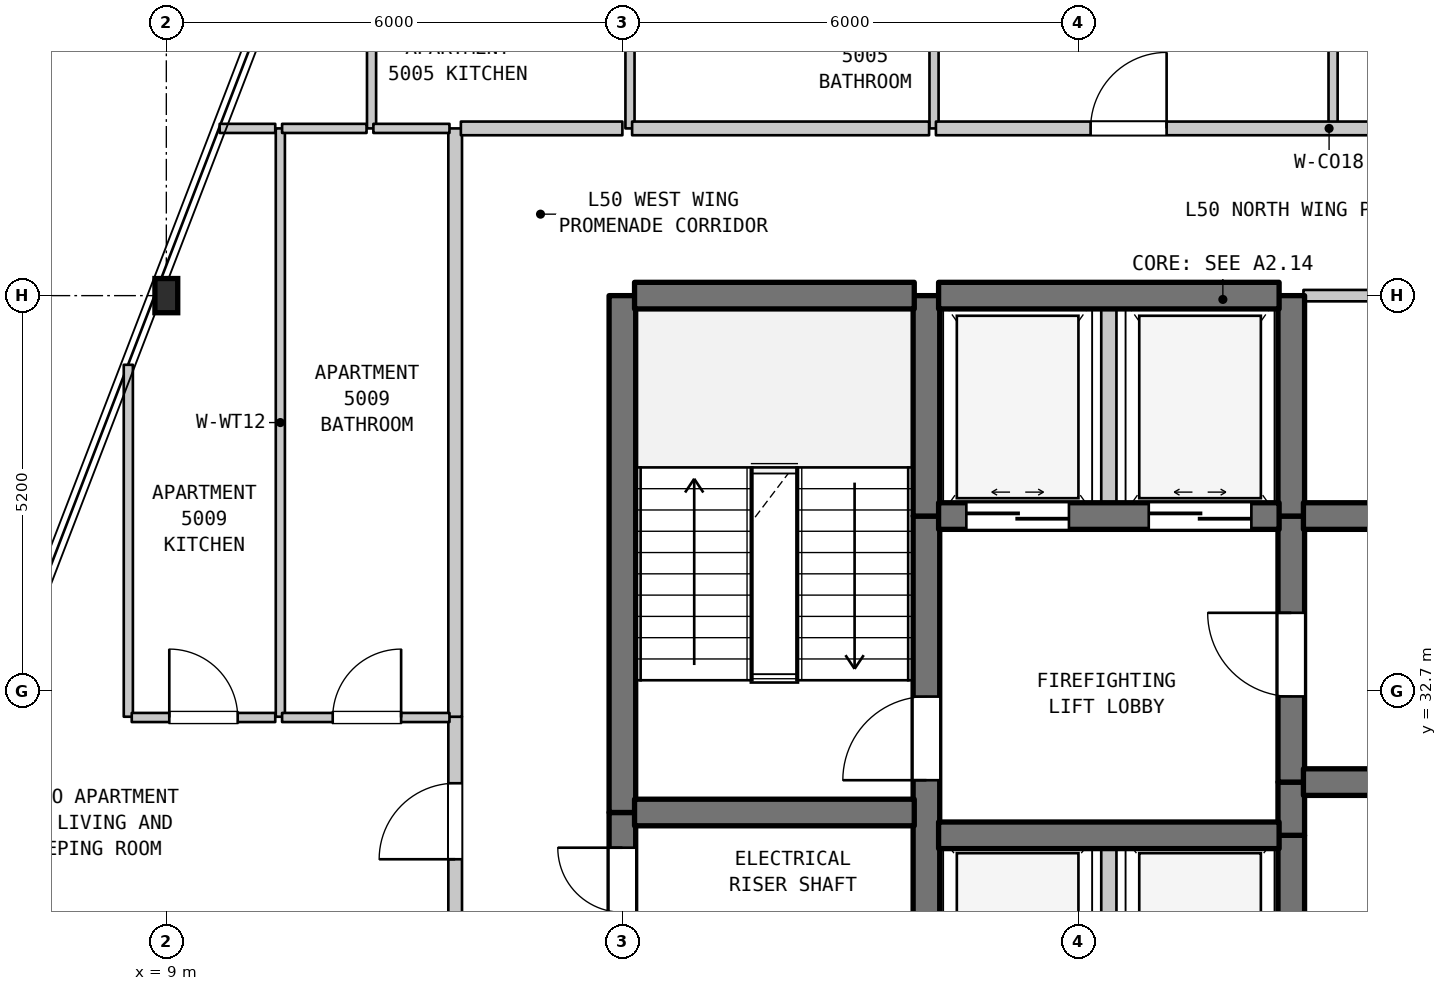
"""IFC4 building model, lengths in metres.
Left out: names, types, materials, properties, quantities, classifications, styles, units other than length and angle.
Written with IfcOpenShell. Run it as: python <this file> out.ifc"""

import sys

from ifc_helpers import new_model, si_unit, direction, frame, frame_2d, origin, origin_2d, place, context, subcontext, project, spatial, rectangle, i_section, extrude, element, fill, save


model = new_model("IFC4")
c1 = context("Model", 3, precision=1e-05, world=origin(), true_north=direction((0.0, 1.0)))
c2 = subcontext(c1, "Body", "Model", "MODEL_VIEW")
j1 = project(units=[si_unit("LENGTHUNIT", "METRE"), si_unit("PLANEANGLEUNIT", "RADIAN")], contexts=[c1])
p1 = place(None, origin())
s1 = spatial("IfcSite", under=j1, at=p1, CompositionType="ELEMENT")
p2 = place(p1, origin())
s2 = spatial("IfcBuilding", under=s1, at=p2, CompositionType="ELEMENT")
p3 = place(p2, frame((0.0, 0.0, 203.2)))
s3 = spatial("IfcBuildingStorey", under=s2, at=p3, CompositionType="ELEMENT", Elevation=203.2)
p4 = place(p3, frame((9.0, 37.9, 0.0), z_axis=(0.0, 0.0, 1.0), x_axis=(1.0, 0.0, 0.0)))
e1 = element("IfcColumn", 1, at=p4, inside=s3, PredefinedType="COLUMN", context=c2, shape_type="SweptSolid", body=[
    extrude(i_section(OverallWidth=0.3, OverallDepth=0.45, WebThickness=0.014, FlangeThickness=0.026, FilletRadius=0.027, at=origin_2d()), origin(), (0.0, 0.0, 1.0), 3.7),
])
p5 = place(p3, frame((8.5, 32.36, 0.0), z_axis=(0.0, 0.0, 1.0), x_axis=(0.0, 1.0, 0.0)))
e2 = element("IfcWall", 2, at=p5, inside=s3, PredefinedType="PARTITIONING", context=c2, shape_type="SweptSolid", body=[
    extrude(rectangle(XDim=4.63, YDim=0.12, at=frame_2d((2.315, 0.0))), origin(), (0.0, 0.0, 1.0), 3.39),
])
p6 = place(p3, frame((10.5, 32.36, 0.0), z_axis=(0.0, 0.0, 1.0), x_axis=(0.0, 1.0, 0.0)))
e3 = element("IfcWall", 3, at=p6, inside=s3, PredefinedType="PARTITIONING", context=c2, shape_type="SweptSolid", body=[
    extrude(rectangle(XDim=7.74, YDim=0.12, at=frame_2d((3.87, 0.0))), origin(), (0.0, 0.0, 1.0), 3.39),
])
p7 = place(p3, frame((11.7, 40.1, 0.0), z_axis=(0.0, 0.0, 1.0), x_axis=(0.0, 1.0, 0.0)))
e4 = element("IfcWall", 4, at=p7, inside=s3, PredefinedType="PARTITIONING", context=c2, shape_type="SweptSolid", body=[
    extrude(rectangle(XDim=2.3, YDim=0.12, at=frame_2d((1.15, 0.0))), origin(), (0.0, 0.0, 1.0), 3.39),
])
p8 = place(p3, frame((12.8, 29.61, 0.0), z_axis=(0.0, 0.0, 1.0), x_axis=(0.0, 1.0, 0.0)))
e5 = element("IfcWall", 5, at=p8, inside=s3, PredefinedType="STANDARD", context=c2, shape_type="SweptSolid", body=[
    extrude(rectangle(XDim=2.75, YDim=0.18, at=frame_2d((1.375, 0.0))), origin(), (0.0, 0.0, 1.0), 3.39),
])
p9 = place(p8, frame((0.875, 0.0, 0.0)))
e6 = element("IfcOpeningElement", 6, at=p9, cuts=e5, PredefinedType="OPENING", context=c2, shape_type="SweptSolid", body=[
    extrude(rectangle(XDim=1.0, YDim=2.15, at=frame_2d((0.5, 1.075))), frame((0.0, 0.1, 0.0), z_axis=(0.0, -1.0, 0.0), x_axis=(1.0, 0.0, 0.0)), (0.0, 0.0, 1.0), 0.2),
])
p10 = place(p3, frame((12.8, 32.36, 0.0), z_axis=(0.0, 0.0, 1.0), x_axis=(0.0, 1.0, 0.0)))
e7 = element("IfcWall", 7, at=p10, inside=s3, PredefinedType="STANDARD", context=c2, shape_type="SweptSolid", body=[
    extrude(rectangle(XDim=7.74, YDim=0.18, at=frame_2d((3.87, 0.0))), origin(), (0.0, 0.0, 1.0), 3.39),
])
p11 = place(p3, frame((15.0, 29.5, 0.0), z_axis=(0.0, 0.0, 1.0), x_axis=(0.0, 1.0, 0.0)))
e8 = element("IfcWall", 8, at=p11, inside=s3, PredefinedType="SHEAR", context=c2, shape_type="SweptSolid", body=[
    extrude(rectangle(XDim=1.6, YDim=0.35, at=frame_2d((0.8, 0.0))), origin(), (0.0, 0.0, 1.0), 3.39),
])
p12 = place(p11, frame((0.287, 0.0, 0.0)))
e9 = element("IfcOpeningElement", 9, at=p12, cuts=e8, PredefinedType="OPENING", context=c2, shape_type="SweptSolid", body=[
    extrude(rectangle(XDim=0.85, YDim=2.1, at=frame_2d((0.425, 1.05))), frame((0.0, 0.185, 0.0), z_axis=(0.0, -1.0, 0.0), x_axis=(1.0, 0.0, 0.0)), (0.0, 0.0, 1.0), 0.37),
])
p13 = place(p3, frame((15.0, 31.1, 0.0), z_axis=(0.0, 0.0, 1.0), x_axis=(0.0, 1.0, 0.0)))
e10 = element("IfcWall", 10, at=p13, inside=s3, PredefinedType="SHEAR", context=c2, shape_type="SweptSolid", body=[
    extrude(rectangle(XDim=6.8, YDim=0.35, at=frame_2d((3.4, 0.0))), origin(), (0.0, 0.0, 1.0), 3.39),
])
p14 = place(p3, frame((15.1, 40.1, 0.0), z_axis=(0.0, 0.0, 1.0), x_axis=(0.0, 1.0, 0.0)))
e11 = element("IfcWall", 11, at=p14, inside=s3, PredefinedType="PARTITIONING", context=c2, shape_type="SweptSolid", body=[
    extrude(rectangle(XDim=2.3, YDim=0.12, at=frame_2d((1.15, 0.0))), origin(), (0.0, 0.0, 1.0), 3.39),
])
p15 = place(p3, frame((19.0, 29.5, 0.0), z_axis=(0.0, 0.0, 1.0), x_axis=(0.0, 1.0, 0.0)))
e12 = element("IfcWall", 12, at=p15, inside=s3, PredefinedType="SHEAR", context=c2, shape_type="SweptSolid", body=[
    extrude(rectangle(XDim=5.5, YDim=0.35, at=frame_2d((2.75, 0.0))), origin(), (0.0, 0.0, 1.0), 3.39),
])
p16 = place(p15, frame((2.025, 0.0, 0.0)))
e13 = element("IfcOpeningElement", 13, at=p16, cuts=e12, PredefinedType="OPENING", context=c2, shape_type="SweptSolid", body=[
    extrude(rectangle(XDim=1.1, YDim=2.15, at=frame_2d((0.55, 1.075))), frame((0.0, 0.185, 0.0), z_axis=(0.0, -1.0, 0.0), x_axis=(1.0, 0.0, 0.0)), (0.0, 0.0, 1.0), 0.37),
])
p17 = place(p3, frame((19.0, 35.0, 0.0), z_axis=(0.0, 0.0, 1.0), x_axis=(0.0, 1.0, 0.0)))
e14 = element("IfcWall", 14, at=p17, inside=s3, PredefinedType="SHEAR", context=c2, shape_type="SweptSolid", body=[
    extrude(rectangle(XDim=2.9, YDim=0.35, at=frame_2d((1.45, 0.0))), origin(), (0.0, 0.0, 1.0), 3.39),
])
p18 = place(p3, frame((19.1, 40.1, 0.0), z_axis=(0.0, 0.0, 1.0), x_axis=(0.0, 1.0, 0.0)))
e15 = element("IfcWall", 15, at=p18, inside=s3, PredefinedType="PARTITIONING", context=c2, shape_type="SweptSolid", body=[
    extrude(rectangle(XDim=2.3, YDim=0.12, at=frame_2d((1.15, 0.0))), origin(), (0.0, 0.0, 1.0), 3.39),
])
p19 = place(p3, frame((21.4, 28.2, 0.0), z_axis=(0.0, 0.0, 1.0), x_axis=(0.0, 1.0, 0.0)))
e16 = element("IfcWall", 16, at=p19, inside=s3, PredefinedType="STANDARD", context=c2, shape_type="SweptSolid", body=[
    extrude(rectangle(XDim=2.6, YDim=0.2, at=frame_2d((1.3, 0.0))), origin(), (0.0, 0.0, 1.0), 3.39),
])
p20 = place(p3, frame((21.4, 35.0, 0.0), z_axis=(0.0, 0.0, 1.0), x_axis=(0.0, 1.0, 0.0)))
e17 = element("IfcWall", 17, at=p20, inside=s3, PredefinedType="STANDARD", context=c2, shape_type="SweptSolid", body=[
    extrude(rectangle(XDim=2.9, YDim=0.2, at=frame_2d((1.45, 0.0))), origin(), (0.0, 0.0, 1.0), 3.39),
])
p21 = place(p3, frame((23.8, 29.5, 0.0), z_axis=(0.0, 0.0, 1.0), x_axis=(0.0, 1.0, 0.0)))
e18 = element("IfcWall", 18, at=p21, inside=s3, PredefinedType="SHEAR", context=c2, shape_type="SweptSolid", body=[
    extrude(rectangle(XDim=1.3, YDim=0.35, at=frame_2d((0.65, 0.0))), origin(), (0.0, 0.0, 1.0), 3.39),
])
p22 = place(p3, frame((23.8, 30.8, 0.0), z_axis=(0.0, 0.0, 1.0), x_axis=(0.0, 1.0, 0.0)))
e19 = element("IfcWall", 19, at=p22, inside=s3, PredefinedType="SHEAR", context=c2, shape_type="SweptSolid", body=[
    extrude(rectangle(XDim=0.7, YDim=0.35, at=frame_2d((0.35, 0.0))), origin(), (0.0, 0.0, 1.0), 3.39),
])
p23 = place(p3, frame((23.8, 31.5, 0.0), z_axis=(0.0, 0.0, 1.0), x_axis=(0.0, 1.0, 0.0)))
e20 = element("IfcWall", 20, at=p23, inside=s3, PredefinedType="SHEAR", context=c2, shape_type="SweptSolid", body=[
    extrude(rectangle(XDim=3.5, YDim=0.35, at=frame_2d((1.75, 0.0))), origin(), (0.0, 0.0, 1.0), 3.39),
])
p24 = place(p23, frame((1.127, 0.0, 0.0)))
e21 = element("IfcOpeningElement", 21, at=p24, cuts=e20, PredefinedType="OPENING", context=c2, shape_type="SweptSolid", body=[
    extrude(rectangle(XDim=1.1, YDim=2.15, at=frame_2d((0.55, 1.075))), frame((0.0, 0.185, 0.0), z_axis=(0.0, -1.0, 0.0), x_axis=(1.0, 0.0, 0.0)), (0.0, 0.0, 1.0), 0.37),
])
p25 = place(p3, frame((23.8, 35.0, 0.0), z_axis=(0.0, 0.0, 1.0), x_axis=(0.0, 1.0, 0.0)))
e22 = element("IfcWall", 22, at=p25, inside=s3, PredefinedType="SHEAR", context=c2, shape_type="SweptSolid", body=[
    extrude(rectangle(XDim=2.9, YDim=0.35, at=frame_2d((1.45, 0.0))), origin(), (0.0, 0.0, 1.0), 3.39),
])
p26 = place(p3, frame((24.35, 40.1, 0.0), z_axis=(0.0, 0.0, 1.0), x_axis=(0.0, 1.0, 0.0)))
e23 = element("IfcWall", 23, at=p26, inside=s3, PredefinedType="PARTITIONING", context=c2, shape_type="SweptSolid", body=[
    extrude(rectangle(XDim=2.05, YDim=0.12, at=frame_2d((1.025, 0.0))), origin(), (0.0, 0.0, 1.0), 3.39),
])
p27 = place(p3, frame((19.16, 30.8, 0.0), z_axis=(0.0, 0.0, 1.0), x_axis=(1.0, 0.0, 0.0)))
e24 = element("IfcWall", 24, at=p27, inside=s3, PredefinedType="SHEAR", context=c2, shape_type="SweptSolid", body=[
    extrude(rectangle(XDim=4.48, YDim=0.35, at=frame_2d((2.24, 0.0))), origin(), (0.0, 0.0, 1.0), 3.39),
])
p28 = place(p3, frame((15.16, 31.1, 0.0), z_axis=(0.0, 0.0, 1.0), x_axis=(1.0, 0.0, 0.0)))
e25 = element("IfcWall", 25, at=p28, inside=s3, PredefinedType="SHEAR", context=c2, shape_type="SweptSolid", body=[
    extrude(rectangle(XDim=3.68, YDim=0.35, at=frame_2d((1.84, 0.0))), origin(), (0.0, 0.0, 1.0), 3.39),
])
p29 = place(p3, frame((23.96, 31.5, 0.0), z_axis=(0.0, 0.0, 1.0), x_axis=(1.0, 0.0, 0.0)))
e26 = element("IfcWall", 26, at=p29, inside=s3, PredefinedType="SHEAR", context=c2, shape_type="SweptSolid", body=[
    extrude(rectangle(XDim=3.18, YDim=0.35, at=frame_2d((1.59, 0.0))), origin(), (0.0, 0.0, 1.0), 3.39),
])
p30 = place(p29, frame((1.094, 0.0, 0.0)))
e27 = element("IfcOpeningElement", 27, at=p30, cuts=e26, PredefinedType="OPENING", context=c2, shape_type="SweptSolid", body=[
    extrude(rectangle(XDim=0.85, YDim=2.1, at=frame_2d((0.425, 1.05))), frame((0.0, 0.185, 0.0), z_axis=(0.0, -1.0, 0.0), x_axis=(1.0, 0.0, 0.0)), (0.0, 0.0, 1.0), 0.37),
])
p31 = place(p3, frame((8.545, 32.35, 0.0), z_axis=(0.0, 0.0, 1.0), x_axis=(1.0, 0.0, 0.0)))
e28 = element("IfcWall", 28, at=p31, inside=s3, PredefinedType="PARTITIONING", context=c2, shape_type="SweptSolid", body=[
    extrude(rectangle(XDim=1.888, YDim=0.12, at=frame_2d((0.944, 0.0))), origin(), (0.0, 0.0, 1.0), 3.39),
])
p32 = place(p31, frame((0.494, 0.0, 0.0)))
e29 = element("IfcOpeningElement", 29, at=p32, cuts=e28, PredefinedType="OPENING", context=c2, shape_type="SweptSolid", body=[
    extrude(rectangle(XDim=0.9, YDim=2.15, at=frame_2d((0.45, 1.075))), frame((0.0, 0.07, 0.0), z_axis=(0.0, -1.0, 0.0), x_axis=(1.0, 0.0, 0.0)), (0.0, 0.0, 1.0), 0.14),
])
p33 = place(p3, frame((10.523, 32.35, 0.0), z_axis=(0.0, 0.0, 1.0), x_axis=(1.0, 0.0, 0.0)))
e30 = element("IfcWall", 30, at=p33, inside=s3, PredefinedType="PARTITIONING", context=c2, shape_type="SweptSolid", body=[
    extrude(rectangle(XDim=2.202, YDim=0.12, at=frame_2d((1.101, 0.0))), origin(), (0.0, 0.0, 1.0), 3.39),
])
p34 = place(p33, frame((0.666, 0.0, 0.0)))
e31 = element("IfcOpeningElement", 31, at=p34, cuts=e30, PredefinedType="OPENING", context=c2, shape_type="SweptSolid", body=[
    extrude(rectangle(XDim=0.9, YDim=2.1, at=frame_2d((0.45, 1.05))), frame((0.0, 0.07, 0.0), z_axis=(0.0, -1.0, 0.0), x_axis=(1.0, 0.0, 0.0)), (0.0, 0.0, 1.0), 0.14),
])
p35 = place(p3, frame((19.16, 35.0, 0.0), z_axis=(0.0, 0.0, 1.0), x_axis=(1.0, 0.0, 0.0)))
e32 = element("IfcWall", 32, at=p35, inside=s3, PredefinedType="SHEAR", context=c2, shape_type="SweptSolid", body=[
    extrude(rectangle(XDim=4.48, YDim=0.35, at=frame_2d((2.24, 0.0))), origin(), (0.0, 0.0, 1.0), 3.39),
])
p36 = place(p35, frame((0.365, 0.0, 0.0)))
e33 = element("IfcOpeningElement", 33, at=p36, cuts=e32, PredefinedType="OPENING", context=c2, shape_type="SweptSolid", body=[
    extrude(rectangle(XDim=1.35, YDim=2.2, at=frame_2d((0.675, 1.1))), frame((0.0, 0.185, 0.0), z_axis=(0.0, -1.0, 0.0), x_axis=(1.0, 0.0, 0.0)), (0.0, 0.0, 1.0), 0.37),
])
p37 = place(p35, frame((2.765, 0.0, 0.0)))
e34 = element("IfcOpeningElement", 34, at=p37, cuts=e32, PredefinedType="OPENING", context=c2, shape_type="SweptSolid", body=[
    extrude(rectangle(XDim=1.35, YDim=2.2, at=frame_2d((0.675, 1.1))), frame((0.0, 0.185, 0.0), z_axis=(0.0, -1.0, 0.0), x_axis=(1.0, 0.0, 0.0)), (0.0, 0.0, 1.0), 0.37),
])
p38 = place(p3, frame((23.96, 35.0, 0.0), z_axis=(0.0, 0.0, 1.0), x_axis=(1.0, 0.0, 0.0)))
e35 = element("IfcWall", 35, at=p38, inside=s3, PredefinedType="SHEAR", context=c2, shape_type="SweptSolid", body=[
    extrude(rectangle(XDim=3.995, YDim=0.35, at=frame_2d((1.998, 0.0))), origin(), (0.0, 0.0, 1.0), 3.39),
])
p39 = place(p38, frame((1.393, 0.0, 0.0)))
e36 = element("IfcOpeningElement", 36, at=p39, cuts=e35, PredefinedType="OPENING", context=c2, shape_type="SweptSolid", body=[
    extrude(rectangle(XDim=0.95, YDim=2.15, at=frame_2d((0.475, 1.075))), frame((0.0, 0.185, 0.0), z_axis=(0.0, -1.0, 0.0), x_axis=(1.0, 0.0, 0.0)), (0.0, 0.0, 1.0), 0.37),
])
p40 = place(p3, frame((15.16, 37.9, 0.0), z_axis=(0.0, 0.0, 1.0), x_axis=(1.0, 0.0, 0.0)))
e37 = element("IfcWall", 37, at=p40, inside=s3, PredefinedType="SHEAR", context=c2, shape_type="SweptSolid", body=[
    extrude(rectangle(XDim=3.68, YDim=0.35, at=frame_2d((1.84, 0.0))), origin(), (0.0, 0.0, 1.0), 3.39),
])
p41 = place(p3, frame((19.16, 37.9, 0.0), z_axis=(0.0, 0.0, 1.0), x_axis=(1.0, 0.0, 0.0)))
e38 = element("IfcWall", 38, at=p41, inside=s3, PredefinedType="SHEAR", context=c2, shape_type="SweptSolid", body=[
    extrude(rectangle(XDim=4.48, YDim=0.35, at=frame_2d((2.24, 0.0))), origin(), (0.0, 0.0, 1.0), 3.39),
])
p42 = place(p3, frame((23.96, 37.9, 0.0), z_axis=(0.0, 0.0, 1.0), x_axis=(1.0, 0.0, 0.0)))
e39 = element("IfcWall", 39, at=p42, inside=s3, PredefinedType="STANDARD", context=c2, shape_type="SweptSolid", body=[
    extrude(rectangle(XDim=3.995, YDim=0.15, at=frame_2d((1.998, 0.0))), origin(), (0.0, 0.0, 1.0), 2.89),
])
p43 = place(p3, frame((9.702, 40.1, 0.0), z_axis=(0.0, 0.0, 1.0), x_axis=(1.0, 0.0, 0.0)))
e40 = element("IfcWall", 40, at=p43, inside=s3, PredefinedType="PARTITIONING", context=c2, shape_type="SweptSolid", body=[
    extrude(rectangle(XDim=0.731, YDim=0.12, at=frame_2d((0.366, 0.0))), origin(), (0.0, 0.0, 1.0), 3.39),
])
p44 = place(p3, frame((10.523, 40.1, 0.0), z_axis=(0.0, 0.0, 1.0), x_axis=(1.0, 0.0, 0.0)))
e41 = element("IfcWall", 41, at=p44, inside=s3, PredefinedType="PARTITIONING", context=c2, shape_type="SweptSolid", body=[
    extrude(rectangle(XDim=1.111, YDim=0.12, at=frame_2d((0.556, 0.0))), origin(), (0.0, 0.0, 1.0), 3.39),
])
p45 = place(p3, frame((11.724, 40.1, 0.0), z_axis=(0.0, 0.0, 1.0), x_axis=(1.0, 0.0, 0.0)))
e42 = element("IfcWall", 42, at=p45, inside=s3, PredefinedType="PARTITIONING", context=c2, shape_type="SweptSolid", body=[
    extrude(rectangle(XDim=1.001, YDim=0.12, at=frame_2d((0.5, 0.0))), origin(), (0.0, 0.0, 1.0), 3.39),
])
p46 = place(p3, frame((12.875, 40.1, 0.0), z_axis=(0.0, 0.0, 1.0), x_axis=(1.0, 0.0, 0.0)))
e43 = element("IfcWall", 43, at=p46, inside=s3, PredefinedType="STANDARD", context=c2, shape_type="SweptSolid", body=[
    extrude(rectangle(XDim=2.125, YDim=0.18, at=frame_2d((1.062, 0.0))), origin(), (0.0, 0.0, 1.0), 3.39),
])
p47 = place(p3, frame((15.128, 40.1, 0.0), z_axis=(0.0, 0.0, 1.0), x_axis=(1.0, 0.0, 0.0)))
e44 = element("IfcWall", 44, at=p47, inside=s3, PredefinedType="STANDARD", context=c2, shape_type="SweptSolid", body=[
    extrude(rectangle(XDim=3.907, YDim=0.18, at=frame_2d((1.954, 0.0))), origin(), (0.0, 0.0, 1.0), 3.39),
])
p48 = place(p3, frame((19.125, 40.1, 0.0), z_axis=(0.0, 0.0, 1.0), x_axis=(1.0, 0.0, 0.0)))
e45 = element("IfcWall", 45, at=p48, inside=s3, PredefinedType="STANDARD", context=c2, shape_type="SweptSolid", body=[
    extrude(rectangle(XDim=10.345, YDim=0.18, at=frame_2d((5.172, 0.0))), origin(), (0.0, 0.0, 1.0), 3.39),
])
p49 = place(p48, frame((2.035, 0.0, 0.0)))
e46 = element("IfcOpeningElement", 46, at=p49, cuts=e45, PredefinedType="OPENING", context=c2, shape_type="SweptSolid", body=[
    extrude(rectangle(XDim=1.0, YDim=2.15, at=frame_2d((0.5, 1.075))), frame((0.0, 0.1, 0.0), z_axis=(0.0, -1.0, 0.0), x_axis=(1.0, 0.0, 0.0)), (0.0, 0.0, 1.0), 0.2),
])
p50 = place(p48, frame((7.235, 0.0, 0.0)))
e47 = element("IfcOpeningElement", 47, at=p50, cuts=e45, PredefinedType="OPENING", context=c2, shape_type="SweptSolid", body=[
    extrude(rectangle(XDim=1.0, YDim=2.15, at=frame_2d((0.5, 1.075))), frame((0.0, 0.1, 0.0), z_axis=(0.0, -1.0, 0.0), x_axis=(1.0, 0.0, 0.0)), (0.0, 0.0, 1.0), 0.2),
])
p51 = place(p9, origin())
e48 = element("IfcDoor", 48, at=p51, inside=s3, OperationType="SINGLE_SWING_LEFT", PredefinedType="DOOR", context=c2, shape_type="SweptSolid", body=[
    extrude(rectangle(XDim=1.0, YDim=2.15, at=frame_2d((0.5, 1.075))), frame((0.0, 0.025, 0.0), z_axis=(0.0, -1.0, 0.0), x_axis=(1.0, 0.0, 0.0)), (0.0, 0.0, 1.0), 0.05),
])
fill(e6, e48)
p52 = place(p12, origin())
e49 = element("IfcDoor", 49, at=p52, inside=s3, OperationType="SINGLE_SWING_RIGHT", PredefinedType="DOOR", context=c2, shape_type="SweptSolid", body=[
    extrude(rectangle(XDim=0.85, YDim=2.1, at=frame_2d((0.425, 1.05))), frame((0.0, 0.025, 0.0), z_axis=(0.0, -1.0, 0.0), x_axis=(1.0, 0.0, 0.0)), (0.0, 0.0, 1.0), 0.05),
])
fill(e9, e49)
p53 = place(p16, origin())
e50 = element("IfcDoor", 50, at=p53, inside=s3, OperationType="SINGLE_SWING_LEFT", PredefinedType="DOOR", context=c2, shape_type="SweptSolid", body=[
    extrude(rectangle(XDim=1.1, YDim=2.15, at=frame_2d((0.55, 1.075))), frame((0.0, 0.025, 0.0), z_axis=(0.0, -1.0, 0.0), x_axis=(1.0, 0.0, 0.0)), (0.0, 0.0, 1.0), 0.05),
])
fill(e13, e50)
p54 = place(p24, origin())
e51 = element("IfcDoor", 51, at=p54, inside=s3, OperationType="SINGLE_SWING_RIGHT", PredefinedType="DOOR", context=c2, shape_type="SweptSolid", body=[
    extrude(rectangle(XDim=1.1, YDim=2.15, at=frame_2d((0.55, 1.075))), frame((0.0, 0.025, 0.0), z_axis=(0.0, -1.0, 0.0), x_axis=(1.0, 0.0, 0.0)), (0.0, 0.0, 1.0), 0.05),
])
fill(e21, e51)
p55 = place(p32, origin())
e52 = element("IfcDoor", 52, at=p55, inside=s3, OperationType="SINGLE_SWING_LEFT", PredefinedType="DOOR", context=c2, shape_type="SweptSolid", body=[
    extrude(rectangle(XDim=0.9, YDim=2.15, at=frame_2d((0.45, 1.075))), frame((0.0, 0.025, 0.0), z_axis=(0.0, -1.0, 0.0), x_axis=(1.0, 0.0, 0.0)), (0.0, 0.0, 1.0), 0.05),
])
fill(e29, e52)
p56 = place(p34, origin())
e53 = element("IfcDoor", 53, at=p56, inside=s3, OperationType="SINGLE_SWING_RIGHT", PredefinedType="DOOR", context=c2, shape_type="SweptSolid", body=[
    extrude(rectangle(XDim=0.9, YDim=2.1, at=frame_2d((0.45, 1.05))), frame((0.0, 0.025, 0.0), z_axis=(0.0, -1.0, 0.0), x_axis=(1.0, 0.0, 0.0)), (0.0, 0.0, 1.0), 0.05),
])
fill(e31, e53)
p57 = place(p36, origin())
e54 = element("IfcDoor", 54, at=p57, inside=s3, OperationType="DOUBLE_DOOR_SLIDING", PredefinedType="DOOR", context=c2, shape_type="SweptSolid", body=[
    extrude(rectangle(XDim=1.35, YDim=2.2, at=frame_2d((0.675, 1.1))), frame((0.0, 0.025, 0.0), z_axis=(0.0, -1.0, 0.0), x_axis=(1.0, 0.0, 0.0)), (0.0, 0.0, 1.0), 0.05),
])
fill(e33, e54)
p58 = place(p37, origin())
e55 = element("IfcDoor", 55, at=p58, inside=s3, OperationType="DOUBLE_DOOR_SLIDING", PredefinedType="DOOR", context=c2, shape_type="SweptSolid", body=[
    extrude(rectangle(XDim=1.35, YDim=2.2, at=frame_2d((0.675, 1.1))), frame((0.0, 0.025, 0.0), z_axis=(0.0, -1.0, 0.0), x_axis=(1.0, 0.0, 0.0)), (0.0, 0.0, 1.0), 0.05),
])
fill(e34, e55)
p59 = place(p49, origin())
e56 = element("IfcDoor", 56, at=p59, inside=s3, OperationType="SINGLE_SWING_RIGHT", PredefinedType="DOOR", context=c2, shape_type="SweptSolid", body=[
    extrude(rectangle(XDim=1.0, YDim=2.15, at=frame_2d((0.5, 1.075))), frame((0.0, 0.025, 0.0), z_axis=(0.0, -1.0, 0.0), x_axis=(1.0, 0.0, 0.0)), (0.0, 0.0, 1.0), 0.05),
])
fill(e46, e56)
save(model, sys.argv[1])
